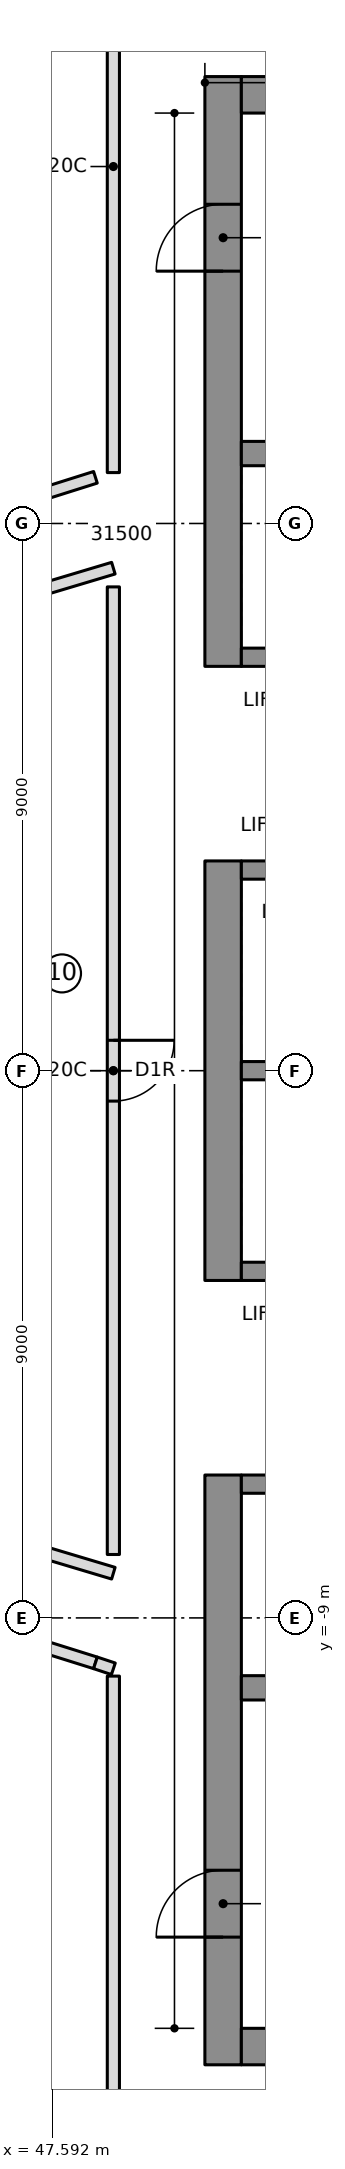
"""IFC4 building model, lengths in metres.
Left out: names, types, materials, properties, quantities, classifications, styles, units other than length and angle.
Written with IfcOpenShell. Run it as: python <this file> out.ifc"""

import sys

from ifc_helpers import new_model, si_unit, direction, frame, frame_2d, origin, place, context, subcontext, project, spatial, rectangle, extrude, element, fill, save


model = new_model("IFC4")
c1 = context("Model", 3, precision=1e-05, world=origin(), true_north=direction((0.0, 1.0)))
c2 = subcontext(c1, "Body", "Model", "MODEL_VIEW")
j1 = project(units=[si_unit("LENGTHUNIT", "METRE"), si_unit("PLANEANGLEUNIT", "RADIAN")], contexts=[c1])
p1 = place(None, origin())
s1 = spatial("IfcSite", under=j1, at=p1, CompositionType="ELEMENT")
p2 = place(p1, origin())
s2 = spatial("IfcBuilding", under=s1, at=p2, CompositionType="ELEMENT")
p3 = place(p2, frame((0.0, 0.0, 242.1)))
s3 = spatial("IfcBuildingStorey", under=s2, at=p3, CompositionType="ELEMENT", Elevation=242.1)
p4 = place(p3, frame((50.4, 6.65, 0.0), z_axis=(0.0, 0.0, 1.0), x_axis=(0.0, 1.0, 0.0)))
e1 = element("IfcWall", 1, at=p4, inside=s3, PredefinedType="SHEAR", context=c2, shape_type="SweptSolid", body=[
    extrude(rectangle(XDim=9.7, YDim=0.6, at=frame_2d((4.85, 0.0))), origin(), (0.0, 0.0, 1.0), 3.55),
])
p5 = place(p4, frame((6.5, 0.0, 0.0)))
e2 = element("IfcOpeningElement", 2, at=p5, cuts=e1, PredefinedType="OPENING", context=c2, shape_type="SweptSolid", body=[
    extrude(rectangle(XDim=1.1, YDim=2.1, at=frame_2d((0.55, 1.05))), frame((0.0, 0.31, 0.0), z_axis=(0.0, -1.0, 0.0), x_axis=(1.0, 0.0, 0.0)), (0.0, 0.0, 1.0), 0.62),
])
p6 = place(p3, frame((50.4, -3.45, 0.0), z_axis=(0.0, 0.0, 1.0), x_axis=(0.0, 1.0, 0.0)))
e3 = element("IfcWall", 3, at=p6, inside=s3, PredefinedType="SHEAR", context=c2, shape_type="SweptSolid", body=[
    extrude(rectangle(XDim=6.9, YDim=0.6, at=frame_2d((3.45, 0.0))), origin(), (0.0, 0.0, 1.0), 3.55),
])
p7 = place(p3, frame((50.4, -16.35, 0.0), z_axis=(0.0, 0.0, 1.0), x_axis=(0.0, 1.0, 0.0)))
e4 = element("IfcWall", 4, at=p7, inside=s3, PredefinedType="SHEAR", context=c2, shape_type="SweptSolid", body=[
    extrude(rectangle(XDim=9.7, YDim=0.6, at=frame_2d((4.85, 0.0))), origin(), (0.0, 0.0, 1.0), 3.55),
])
p8 = place(p7, frame((2.1, 0.0, 0.0)))
e5 = element("IfcOpeningElement", 5, at=p8, cuts=e4, PredefinedType="OPENING", context=c2, shape_type="SweptSolid", body=[
    extrude(rectangle(XDim=1.1, YDim=2.1, at=frame_2d((0.55, 1.05))), frame((0.0, 0.31, 0.0), z_axis=(0.0, -1.0, 0.0), x_axis=(1.0, 0.0, 0.0)), (0.0, 0.0, 1.0), 0.62),
])
for number, where, z_axis, x_axis in (
    (6, (50.7, 16.05, 0.0), (0.0, 0.0, 1.0), (1.0, 0.0, 0.0)),
    (7, (50.7, -16.05, 0.0), (0.0, 0.0, 1.0), (1.0, 0.0, 0.0)),
):
    element("IfcWall", number, at=place(p3, frame(where, z_axis=z_axis, x_axis=x_axis)), inside=s3, PredefinedType="SHEAR", context=c2, shape_type="SweptSolid", body=[
        extrude(rectangle(XDim=13.62, YDim=0.6, at=frame_2d((6.81, 0.0))), origin(), (0.0, 0.0, 1.0), 3.55),
    ])
p9 = place(p3, frame((50.7, 10.15, 0.0), z_axis=(0.0, 0.0, 1.0), x_axis=(1.0, 0.0, 0.0)))
e8 = element("IfcWall", 8, at=p9, inside=s3, PredefinedType="SHEAR", context=c2, shape_type="SweptSolid", body=[
    extrude(rectangle(XDim=13.02, YDim=0.4, at=frame_2d((6.51, 0.0))), origin(), (0.0, 0.0, 1.0), 3.55),
])
p10 = place(p9, frame((0.7, 0.0, 0.0)))
e9 = element("IfcOpeningElement", 9, at=p10, cuts=e8, PredefinedType="OPENING", context=c2, shape_type="SweptSolid", body=[
    extrude(rectangle(XDim=1.1, YDim=2.1, at=frame_2d((0.55, 1.05))), frame((0.0, 0.21, 0.0), z_axis=(0.0, -1.0, 0.0), x_axis=(1.0, 0.0, 0.0)), (0.0, 0.0, 1.0), 0.42),
])
p11 = place(p9, frame((3.5, 0.0, 0.0)))
e10 = element("IfcOpeningElement", 10, at=p11, cuts=e8, PredefinedType="OPENING", context=c2, shape_type="SweptSolid", body=[
    extrude(rectangle(XDim=1.1, YDim=2.1, at=frame_2d((0.55, 1.05))), frame((0.0, 0.21, 0.0), z_axis=(0.0, -1.0, 0.0), x_axis=(1.0, 0.0, 0.0)), (0.0, 0.0, 1.0), 0.42),
])
p12 = place(p3, frame((50.7, -10.15, 0.0), z_axis=(0.0, 0.0, 1.0), x_axis=(1.0, 0.0, 0.0)))
e11 = element("IfcWall", 11, at=p12, inside=s3, PredefinedType="SHEAR", context=c2, shape_type="SweptSolid", body=[
    extrude(rectangle(XDim=13.02, YDim=0.4, at=frame_2d((6.51, 0.0))), origin(), (0.0, 0.0, 1.0), 3.55),
])
p13 = place(p3, frame((50.7, 0.0, 0.0), z_axis=(0.0, 0.0, 1.0), x_axis=(1.0, 0.0, 0.0)))
e12 = element("IfcWall", 12, at=p13, inside=s3, PredefinedType="SHEAR", context=c2, shape_type="SweptSolid", body=[
    extrude(rectangle(XDim=10.9, YDim=0.3, at=frame_2d((5.45, 0.0))), origin(), (0.0, 0.0, 1.0), 3.55),
])
p14 = place(p3, frame((50.7, 3.3, 0.0), z_axis=(0.0, 0.0, 1.0), x_axis=(1.0, 0.0, 0.0)))
e13 = element("IfcWall", 13, at=p14, inside=s3, PredefinedType="SHEAR", context=c2, shape_type="SweptSolid", body=[
    extrude(rectangle(XDim=10.9, YDim=0.3, at=frame_2d((5.45, 0.0))), origin(), (0.0, 0.0, 1.0), 3.55),
])
p15 = place(p14, frame((0.7, 0.0, 0.0)))
e14 = element("IfcOpeningElement", 14, at=p15, cuts=e13, PredefinedType="OPENING", context=c2, shape_type="SweptSolid", body=[
    extrude(rectangle(XDim=1.1, YDim=2.1, at=frame_2d((0.55, 1.05))), frame((0.0, 0.16, 0.0), z_axis=(0.0, -1.0, 0.0), x_axis=(1.0, 0.0, 0.0)), (0.0, 0.0, 1.0), 0.32),
])
p16 = place(p14, frame((3.5, 0.0, 0.0)))
e15 = element("IfcOpeningElement", 15, at=p16, cuts=e13, PredefinedType="OPENING", context=c2, shape_type="SweptSolid", body=[
    extrude(rectangle(XDim=1.1, YDim=2.1, at=frame_2d((0.55, 1.05))), frame((0.0, 0.16, 0.0), z_axis=(0.0, -1.0, 0.0), x_axis=(1.0, 0.0, 0.0)), (0.0, 0.0, 1.0), 0.32),
])
p17 = place(p14, frame((6.4, 0.0, 0.0)))
e16 = element("IfcOpeningElement", 16, at=p17, cuts=e13, PredefinedType="OPENING", context=c2, shape_type="SweptSolid", body=[
    extrude(rectangle(XDim=0.9, YDim=2.1, at=frame_2d((0.45, 1.05))), frame((0.0, 0.16, 0.0), z_axis=(0.0, -1.0, 0.0), x_axis=(1.0, 0.0, 0.0)), (0.0, 0.0, 1.0), 0.32),
])
p18 = place(p14, frame((9.2, 0.0, 0.0)))
e17 = element("IfcOpeningElement", 17, at=p18, cuts=e13, PredefinedType="OPENING", context=c2, shape_type="SweptSolid", body=[
    extrude(rectangle(XDim=0.9, YDim=2.1, at=frame_2d((0.45, 1.05))), frame((0.0, 0.16, 0.0), z_axis=(0.0, -1.0, 0.0), x_axis=(1.0, 0.0, 0.0)), (0.0, 0.0, 1.0), 0.32),
])
p19 = place(p3, frame((50.7, 6.8, 0.0), z_axis=(0.0, 0.0, 1.0), x_axis=(1.0, 0.0, 0.0)))
e18 = element("IfcWall", 18, at=p19, inside=s3, PredefinedType="SHEAR", context=c2, shape_type="SweptSolid", body=[
    extrude(rectangle(XDim=10.9, YDim=0.3, at=frame_2d((5.45, 0.0))), origin(), (0.0, 0.0, 1.0), 3.55),
])
p20 = place(p19, frame((6.4, 0.0, 0.0)))
e19 = element("IfcOpeningElement", 19, at=p20, cuts=e18, PredefinedType="OPENING", context=c2, shape_type="SweptSolid", body=[
    extrude(rectangle(XDim=0.9, YDim=2.1, at=frame_2d((0.45, 1.05))), frame((0.0, 0.16, 0.0), z_axis=(0.0, -1.0, 0.0), x_axis=(1.0, 0.0, 0.0)), (0.0, 0.0, 1.0), 0.32),
])
p21 = place(p19, frame((9.2, 0.0, 0.0)))
e20 = element("IfcOpeningElement", 20, at=p21, cuts=e18, PredefinedType="OPENING", context=c2, shape_type="SweptSolid", body=[
    extrude(rectangle(XDim=0.9, YDim=2.1, at=frame_2d((0.45, 1.05))), frame((0.0, 0.16, 0.0), z_axis=(0.0, -1.0, 0.0), x_axis=(1.0, 0.0, 0.0)), (0.0, 0.0, 1.0), 0.32),
])
p22 = place(p3, frame((50.7, -3.3, 0.0), z_axis=(0.0, 0.0, 1.0), x_axis=(1.0, 0.0, 0.0)))
e21 = element("IfcWall", 21, at=p22, inside=s3, PredefinedType="SHEAR", context=c2, shape_type="SweptSolid", body=[
    extrude(rectangle(XDim=10.9, YDim=0.3, at=frame_2d((5.45, 0.0))), origin(), (0.0, 0.0, 1.0), 3.55),
])
p23 = place(p22, frame((9.1, 0.0, 0.0)))
e22 = element("IfcOpeningElement", 22, at=p23, cuts=e21, PredefinedType="OPENING", context=c2, shape_type="SweptSolid", body=[
    extrude(rectangle(XDim=1.1, YDim=2.1, at=frame_2d((0.55, 1.05))), frame((0.0, 0.16, 0.0), z_axis=(0.0, -1.0, 0.0), x_axis=(1.0, 0.0, 0.0)), (0.0, 0.0, 1.0), 0.32),
])
p24 = place(p3, frame((50.7, -6.8, 0.0), z_axis=(0.0, 0.0, 1.0), x_axis=(1.0, 0.0, 0.0)))
e23 = element("IfcWall", 23, at=p24, inside=s3, PredefinedType="SHEAR", context=c2, shape_type="SweptSolid", body=[
    extrude(rectangle(XDim=10.9, YDim=0.3, at=frame_2d((5.45, 0.0))), origin(), (0.0, 0.0, 1.0), 3.55),
])
p25 = place(p24, frame((6.3, 0.0, 0.0)))
e24 = element("IfcOpeningElement", 24, at=p25, cuts=e23, PredefinedType="OPENING", context=c2, shape_type="SweptSolid", body=[
    extrude(rectangle(XDim=1.1, YDim=2.1, at=frame_2d((0.55, 1.05))), frame((0.0, 0.16, 0.0), z_axis=(0.0, -1.0, 0.0), x_axis=(1.0, 0.0, 0.0)), (0.0, 0.0, 1.0), 0.32),
])
p26 = place(p24, frame((9.1, 0.0, 0.0)))
e25 = element("IfcOpeningElement", 25, at=p26, cuts=e23, PredefinedType="OPENING", context=c2, shape_type="SweptSolid", body=[
    extrude(rectangle(XDim=1.1, YDim=2.1, at=frame_2d((0.55, 1.05))), frame((0.0, 0.16, 0.0), z_axis=(0.0, -1.0, 0.0), x_axis=(1.0, 0.0, 0.0)), (0.0, 0.0, 1.0), 0.32),
])
p27 = place(p24, frame((0.8, 0.0, 0.0)))
e26 = element("IfcOpeningElement", 26, at=p27, cuts=e23, PredefinedType="OPENING", context=c2, shape_type="SweptSolid", body=[
    extrude(rectangle(XDim=0.9, YDim=2.1, at=frame_2d((0.45, 1.05))), frame((0.0, 0.16, 0.0), z_axis=(0.0, -1.0, 0.0), x_axis=(1.0, 0.0, 0.0)), (0.0, 0.0, 1.0), 0.32),
])
p28 = place(p24, frame((3.6, 0.0, 0.0)))
e27 = element("IfcOpeningElement", 27, at=p28, cuts=e23, PredefinedType="OPENING", context=c2, shape_type="SweptSolid", body=[
    extrude(rectangle(XDim=0.9, YDim=2.1, at=frame_2d((0.45, 1.05))), frame((0.0, 0.16, 0.0), z_axis=(0.0, -1.0, 0.0), x_axis=(1.0, 0.0, 0.0)), (0.0, 0.0, 1.0), 0.32),
])
p29 = place(p3, frame((40.38, 7.257, 0.0), z_axis=(0.0, 0.0, 1.0), x_axis=(0.953536454425, 0.301277662768, 0.0)))
e28 = element("IfcWall", 28, at=p29, inside=s3, PredefinedType="PARTITIONING", context=c2, shape_type="SweptSolid", body=[
    extrude(rectangle(XDim=8.306, YDim=0.2, at=frame_2d((4.153, 0.0))), origin(), (0.0, 0.0, 1.0), 3.25),
])
p30 = place(p29, frame((2.8, 0.0, 0.0)))
e29 = element("IfcOpeningElement", 29, at=p30, cuts=e28, PredefinedType="OPENING", context=c2, shape_type="SweptSolid", body=[
    extrude(rectangle(XDim=1.5, YDim=2.1, at=frame_2d((0.75, 1.05))), frame((0.0, 0.11, 0.0), z_axis=(0.0, -1.0, 0.0), x_axis=(1.0, 0.0, 0.0)), (0.0, 0.0, 1.0), 0.22),
])
p31 = place(p3, frame((40.38, -7.257, 0.0), z_axis=(0.0, 0.0, 1.0), x_axis=(0.954235234728, -0.299057046068, 0.0)))
e30 = element("IfcWall", 30, at=p31, inside=s3, PredefinedType="PARTITIONING", context=c2, shape_type="SweptSolid", body=[
    extrude(rectangle(XDim=8.3, YDim=0.2, at=frame_2d((4.15, 0.0))), origin(), (0.0, 0.0, 1.0), 3.25),
])
p32 = place(p31, frame((2.8, 0.0, 0.0)))
e31 = element("IfcOpeningElement", 31, at=p32, cuts=e30, PredefinedType="OPENING", context=c2, shape_type="SweptSolid", body=[
    extrude(rectangle(XDim=1.5, YDim=2.1, at=frame_2d((0.75, 1.05))), frame((0.0, 0.11, 0.0), z_axis=(0.0, -1.0, 0.0), x_axis=(1.0, 0.0, 0.0)), (0.0, 0.0, 1.0), 0.22),
])
p33 = place(p3, frame((48.595, 7.957, 0.0), z_axis=(0.0, 0.0, 1.0), x_axis=(0.0, -1.0, 0.0)))
e32 = element("IfcWall", 32, at=p33, inside=s3, PredefinedType="PARTITIONING", context=c2, shape_type="SweptSolid", body=[
    extrude(rectangle(XDim=15.914, YDim=0.2, at=frame_2d((7.957, 0.0))), origin(), (0.0, 0.0, 1.0), 3.25),
])
p34 = place(p33, frame((7.457, 0.0, 0.0)))
e33 = element("IfcOpeningElement", 33, at=p34, cuts=e32, PredefinedType="OPENING", context=c2, shape_type="SweptSolid", body=[
    extrude(rectangle(XDim=1.0, YDim=2.1, at=frame_2d((0.5, 1.05))), frame((0.0, 0.11, 0.0), z_axis=(0.0, -1.0, 0.0), x_axis=(1.0, 0.0, 0.0)), (0.0, 0.0, 1.0), 0.22),
])
for number, where, z_axis, x_axis in (
    (34, (46.855, 7.744, 0.0), (0.0, 0.0, 1.0), (0.958, 0.287, 0.0)),
    (35, (48.595, -8.265, 0.0), (0.0, 0.0, 1.0), (-0.958, 0.287, 0.0)),
):
    element("IfcWall", number, at=place(p3, frame(where, z_axis=z_axis, x_axis=x_axis)), inside=s3, PredefinedType="PARTITIONING", context=c2, shape_type="SweptSolid", body=[
        extrude(rectangle(XDim=1.816, YDim=0.2, at=frame_2d((0.908, 0.0))), origin(), (0.0, 0.0, 1.0), 3.25),
    ])
p35 = place(p3, frame((48.595, 19.904, 0.0), z_axis=(0.0, 0.0, 1.0), x_axis=(0.0, -1.0, 0.0)))
e36 = element("IfcWall", 36, at=p35, inside=s3, PredefinedType="PARTITIONING", context=c2, shape_type="SweptSolid", body=[
    extrude(rectangle(XDim=10.067, YDim=0.2, at=frame_2d((5.034, 0.0))), origin(), (0.0, 0.0, 1.0), 3.25),
])
p36 = place(p3, frame((48.3, -9.739, 0.0), z_axis=(0.0, 0.0, 1.0), x_axis=(0.949310105444, -0.314341094518, 0.0)))
e37 = element("IfcWall", 37, at=p36, inside=s3, PredefinedType="PARTITIONING", context=c2, shape_type="SweptSolid", body=[
    extrude(rectangle(XDim=0.311, YDim=0.2, at=frame_2d((0.155, 0.0))), origin(), (0.0, 0.0, 1.0), 3.25),
])
p37 = place(p3, frame((48.595, -9.957, 0.0), z_axis=(0.0, 0.0, 1.0), x_axis=(0.0, -1.0, 0.0)))
e38 = element("IfcWall", 38, at=p37, inside=s3, PredefinedType="PARTITIONING", context=c2, shape_type="SweptSolid", body=[
    extrude(rectangle(XDim=9.947, YDim=0.2, at=frame_2d((4.974, 0.0))), origin(), (0.0, 0.0, 1.0), 3.25),
])
p38 = place(p34, origin())
e39 = element("IfcDoor", 39, at=p38, inside=s3, OperationType="SINGLE_SWING_RIGHT", PredefinedType="DOOR", context=c2, shape_type="SweptSolid", body=[
    extrude(rectangle(XDim=1.0, YDim=2.1, at=frame_2d((0.5, 1.05))), frame((0.0, 0.025, 0.0), z_axis=(0.0, -1.0, 0.0), x_axis=(1.0, 0.0, 0.0)), (0.0, 0.0, 1.0), 0.05),
])
fill(e33, e39)
p39 = place(p5, origin())
e40 = element("IfcDoor", 40, at=p39, inside=s3, OperationType="SINGLE_SWING_RIGHT", PredefinedType="DOOR", context=c2, shape_type="SweptSolid", body=[
    extrude(rectangle(XDim=1.1, YDim=2.1, at=frame_2d((0.55, 1.05))), frame((0.0, 0.025, 0.0), z_axis=(0.0, -1.0, 0.0), x_axis=(1.0, 0.0, 0.0)), (0.0, 0.0, 1.0), 0.05),
])
fill(e2, e40)
p40 = place(p8, origin())
e41 = element("IfcDoor", 41, at=p40, inside=s3, OperationType="SINGLE_SWING_RIGHT", PredefinedType="DOOR", context=c2, shape_type="SweptSolid", body=[
    extrude(rectangle(XDim=1.1, YDim=2.1, at=frame_2d((0.55, 1.05))), frame((0.0, 0.025, 0.0), z_axis=(0.0, -1.0, 0.0), x_axis=(1.0, 0.0, 0.0)), (0.0, 0.0, 1.0), 0.05),
])
fill(e5, e41)
save(model, sys.argv[1])
